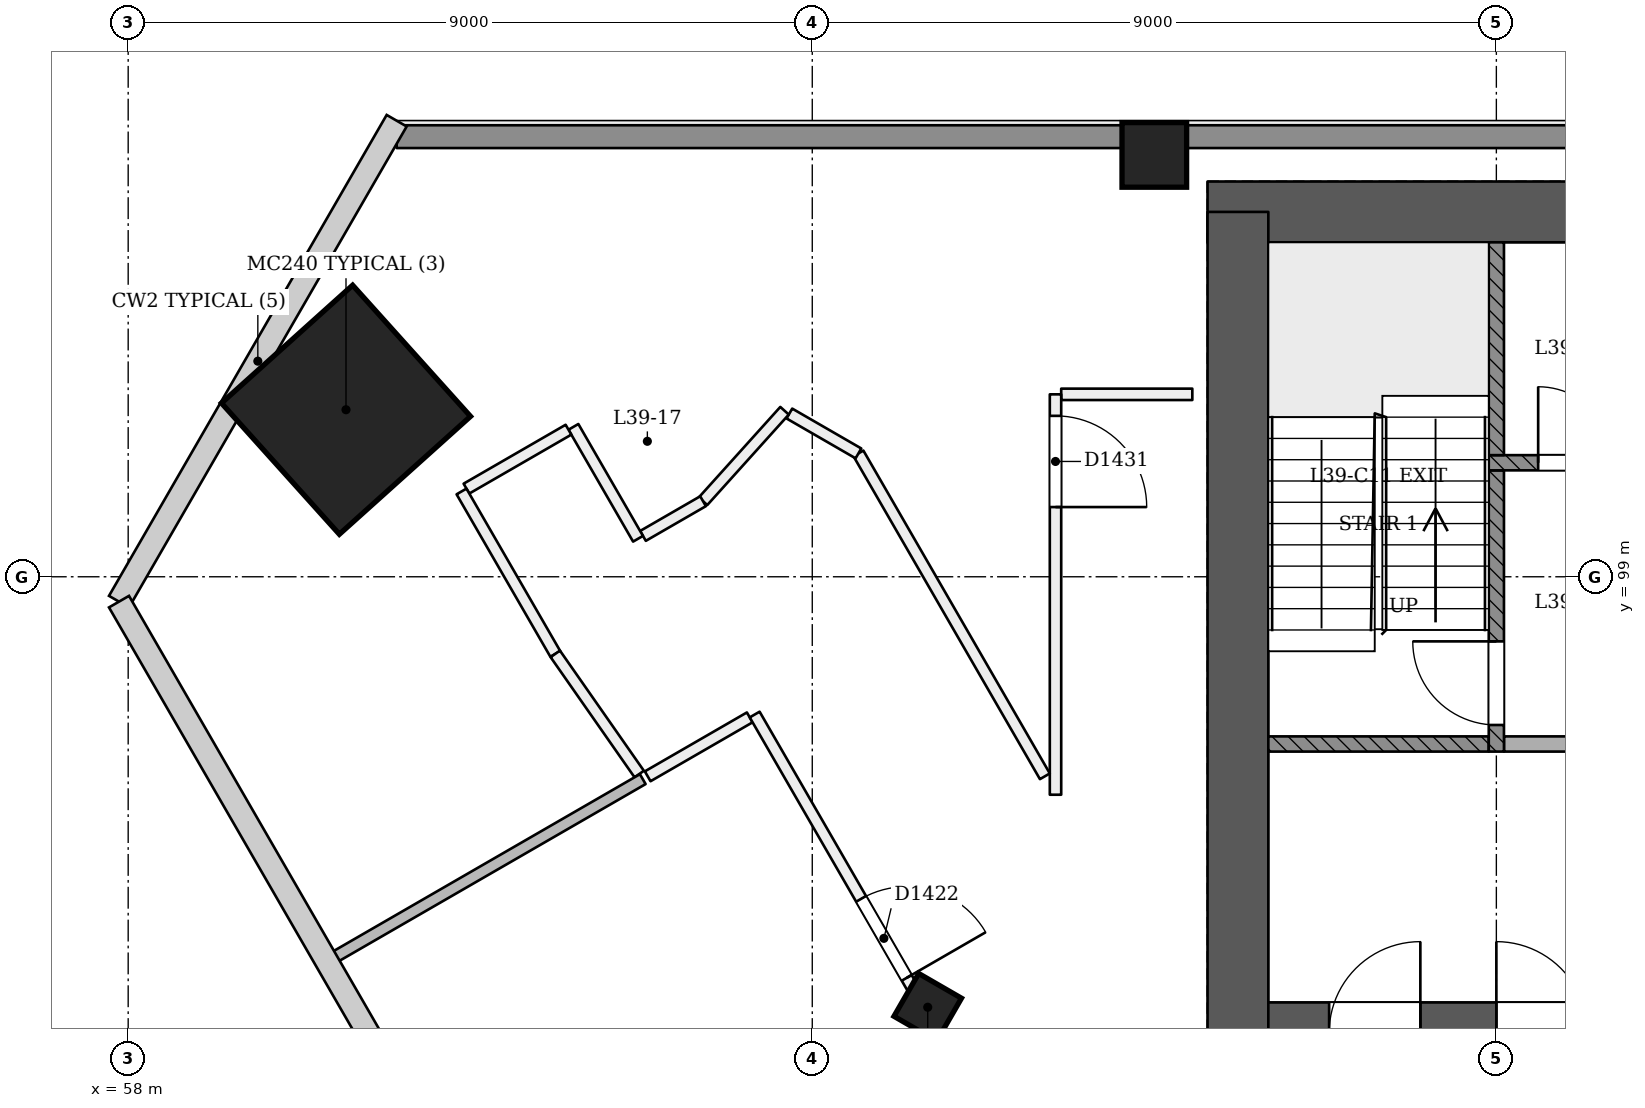
"""IFC4 building model, lengths in metres.
Left out: names, types, materials, properties, quantities, classifications, styles, units other than length and angle.
Written with IfcOpenShell. Run it as: python <this file> out.ifc"""

import sys

from ifc_helpers import new_model, si_unit, direction, frame, frame_2d, origin, origin_2d, place, context, subcontext, project, spatial, rectangle, extrude, element, fill, save


model = new_model("IFC4")
c1 = context("Model", 3, precision=1e-05, world=origin(), true_north=direction((0.0, 1.0)))
c2 = subcontext(c1, "Body", "Model", "MODEL_VIEW")
j1 = project(units=[si_unit("LENGTHUNIT", "METRE"), si_unit("PLANEANGLEUNIT", "RADIAN")], contexts=[c1])
p1 = place(None, origin())
s1 = spatial("IfcSite", under=j1, at=p1, CompositionType="ELEMENT")
p2 = place(p1, origin())
s2 = spatial("IfcBuilding", under=s1, at=p2, CompositionType="ELEMENT")
p3 = place(p2, frame((0.0, 0.0, 153.0)))
s3 = spatial("IfcBuildingStorey", under=s2, at=p3, CompositionType="ELEMENT", Elevation=153.0)
p4 = place(p3, frame((72.6, 93.0, 0.0), z_axis=(0.0, 0.0, 1.0), x_axis=(1.0, 0.0, 0.0)))
e1 = element("IfcWall", 1, at=p4, inside=s3, PredefinedType="SHEAR", context=c2, shape_type="SweptSolid", body=[
    extrude(rectangle(XDim=25.2, YDim=0.8, at=frame_2d((12.6, 0.0))), origin(), (0.0, 0.0, 1.0), 3.6),
])
p5 = place(p4, frame((1.2, 0.0, 0.0)))
e2 = element("IfcOpeningElement", 2, at=p5, cuts=e1, PredefinedType="OPENING", context=c2, shape_type="SweptSolid", body=[
    extrude(rectangle(XDim=1.2, YDim=2.1, at=frame_2d((0.6, 1.05))), frame((0.0, 0.411, 0.0), z_axis=(0.0, -1.0, 0.0), x_axis=(1.0, 0.0, 0.0)), (0.0, 0.0, 1.0), 0.821),
])
p6 = place(p4, frame((3.4, 0.0, 0.0)))
e3 = element("IfcOpeningElement", 3, at=p6, cuts=e1, PredefinedType="OPENING", context=c2, shape_type="SweptSolid", body=[
    extrude(rectangle(XDim=1.2, YDim=2.1, at=frame_2d((0.6, 1.05))), frame((0.0, 0.411, 0.0), z_axis=(0.0, -1.0, 0.0), x_axis=(1.0, 0.0, 0.0)), (0.0, 0.0, 1.0), 0.821),
])
p7 = place(p4, frame((13.4, 0.0, 0.0)))
e4 = element("IfcOpeningElement", 4, at=p7, cuts=e1, PredefinedType="OPENING", context=c2, shape_type="SweptSolid", body=[
    extrude(rectangle(XDim=1.2, YDim=2.1, at=frame_2d((0.6, 1.05))), frame((0.0, 0.411, 0.0), z_axis=(0.0, -1.0, 0.0), x_axis=(1.0, 0.0, 0.0)), (0.0, 0.0, 1.0), 0.821),
])
p8 = place(p4, frame((15.712, 0.0, 0.0)))
e5 = element("IfcOpeningElement", 5, at=p8, cuts=e1, PredefinedType="OPENING", context=c2, shape_type="SweptSolid", body=[
    extrude(rectangle(XDim=1.0, YDim=2.1, at=frame_2d((0.5, 1.05))), frame((0.0, 0.411, 0.0), z_axis=(0.0, -1.0, 0.0), x_axis=(1.0, 0.0, 0.0)), (0.0, 0.0, 1.0), 0.821),
])
p9 = place(p4, frame((19.15, 0.0, 0.0)))
e6 = element("IfcOpeningElement", 6, at=p9, cuts=e1, PredefinedType="OPENING", context=c2, shape_type="SweptSolid", body=[
    extrude(rectangle(XDim=1.0, YDim=2.1, at=frame_2d((0.5, 1.05))), frame((0.0, 0.411, 0.0), z_axis=(0.0, -1.0, 0.0), x_axis=(1.0, 0.0, 0.0)), (0.0, 0.0, 1.0), 0.821),
])
p10 = place(p4, frame((22.688, 0.0, 0.0)))
e7 = element("IfcOpeningElement", 7, at=p10, cuts=e1, PredefinedType="OPENING", context=c2, shape_type="SweptSolid", body=[
    extrude(rectangle(XDim=1.0, YDim=2.1, at=frame_2d((0.5, 1.05))), frame((0.0, 0.411, 0.0), z_axis=(0.0, -1.0, 0.0), x_axis=(1.0, 0.0, 0.0)), (0.0, 0.0, 1.0), 0.821),
])
p11 = place(p3, frame((97.4, 103.8, 0.0), z_axis=(0.0, 0.0, 1.0), x_axis=(-1.0, 0.0, 0.0)))
e8 = element("IfcWall", 8, at=p11, inside=s3, PredefinedType="SHEAR", context=c2, shape_type="SweptSolid", body=[
    extrude(rectangle(XDim=25.2, YDim=0.8, at=frame_2d((12.6, 0.0))), origin(), (0.0, 0.0, 1.0), 3.6),
])
p12 = place(p3, frame((72.6, 103.8, 0.0), z_axis=(0.0, 0.0, 1.0), x_axis=(0.0, -1.0, 0.0)))
e9 = element("IfcWall", 9, at=p12, inside=s3, PredefinedType="SHEAR", context=c2, shape_type="SweptSolid", body=[
    extrude(rectangle(XDim=11.2, YDim=0.8, at=frame_2d((5.6, 0.0))), origin(), (0.0, 0.0, 1.0), 3.6),
])
p13 = place(p3, frame((68.492, 93.29, -0.02), z_axis=(0.02215369191, 0.038413282303, 0.999016333038), x_axis=(-0.86535929663, -0.499678396489, 0.038402966283)))
e10 = element("IfcColumn", 10, at=p13, inside=s3, PredefinedType="COLUMN", context=c2, shape_type="SweptSolid", body=[
    extrude(rectangle(XDim=0.65, YDim=0.65, at=origin_2d()), origin(), (0.0, 0.0, 1.0), 3.604),
])
p14 = place(p3, frame((60.832, 101.186, 0.0), z_axis=(0.028401796786, 0.009286506348, 0.999553449666), x_axis=(-0.866197501375, 0.499302452977, 0.019973709278)))
e11 = element("IfcColumn", 11, at=p14, inside=s3, PredefinedType="COLUMN", context=c2, shape_type="SweptSolid", body=[
    extrude(rectangle(XDim=2.32, YDim=2.32, at=origin_2d()), origin(), (0.0, 0.0, 1.0), 3.602),
])
p15 = place(p3, frame((71.5, 104.55, 0.0), z_axis=(0.0, 0.0, 1.0), x_axis=(1.0, 0.0, 0.0)))
e12 = element("IfcColumn", 12, at=p15, inside=s3, PredefinedType="COLUMN", context=c2, shape_type="SweptSolid", body=[
    extrude(rectangle(XDim=0.85, YDim=0.85, at=origin_2d()), origin(), (0.0, 0.0, 1.0), 3.6),
])
p16 = place(p3, frame((64.835, 96.375, 0.0), z_axis=(0.0, 0.0, 1.0), x_axis=(0.86601511528, 0.500017819788, 0.0)))
e13 = element("IfcWall", 13, at=p16, inside=s3, PredefinedType="PARTITIONING", context=c2, shape_type="SweptSolid", body=[
    extrude(rectangle(XDim=1.55, YDim=0.15, at=frame_2d((0.775, 0.0))), origin(), (0.0, 0.0, 1.0), 3.15),
])
p17 = place(p3, frame((66.242, 97.188, 0.0), z_axis=(0.0, 0.0, 1.0), x_axis=(0.500002614046, -0.866023894559, 0.0)))
e14 = element("IfcWall", 14, at=p17, inside=s3, PredefinedType="PARTITIONING", context=c2, shape_type="SweptSolid", body=[
    extrude(rectangle(XDim=37.515, YDim=0.15, at=frame_2d((18.758, 0.0))), origin(), (0.0, 0.0, 1.0), 2.75),
])
p18 = place(p17, frame((2.8, 0.0, 0.0)))
e15 = element("IfcOpeningElement", 15, at=p18, cuts=e14, PredefinedType="OPENING", context=c2, shape_type="SweptSolid", body=[
    extrude(rectangle(XDim=1.2, YDim=2.1, at=frame_2d((0.6, 1.05))), frame((0.0, 0.085, 0.0), z_axis=(0.0, -1.0, 0.0), x_axis=(1.0, 0.0, 0.0)), (0.0, 0.0, 1.0), 0.171),
])
p19 = place(p17, frame((11.8, 0.0, 0.0)))
e16 = element("IfcOpeningElement", 16, at=p19, cuts=e14, PredefinedType="OPENING", context=c2, shape_type="SweptSolid", body=[
    extrude(rectangle(XDim=1.2, YDim=2.1, at=frame_2d((0.6, 1.05))), frame((0.0, 0.085, 0.0), z_axis=(0.0, -1.0, 0.0), x_axis=(1.0, 0.0, 0.0)), (0.0, 0.0, 1.0), 0.171),
])
p20 = place(p17, frame((24.15, 0.0, 0.0)))
e17 = element("IfcOpeningElement", 17, at=p20, cuts=e14, PredefinedType="OPENING", context=c2, shape_type="SweptSolid", body=[
    extrude(rectangle(XDim=1.2, YDim=2.1, at=frame_2d((0.6, 1.05))), frame((0.0, 0.085, 0.0), z_axis=(0.0, -1.0, 0.0), x_axis=(1.0, 0.0, 0.0)), (0.0, 0.0, 1.0), 0.171),
])
p21 = place(p17, frame((33.25, 0.0, 0.0)))
e18 = element("IfcOpeningElement", 18, at=p21, cuts=e14, PredefinedType="OPENING", context=c2, shape_type="SweptSolid", body=[
    extrude(rectangle(XDim=1.0, YDim=2.1, at=frame_2d((0.5, 1.05))), frame((0.0, 0.085, 0.0), z_axis=(0.0, -1.0, 0.0), x_axis=(1.0, 0.0, 0.0)), (0.0, 0.0, 1.0), 0.171),
])
p22 = place(p3, frame((72.0, 101.4, 0.0), z_axis=(0.0, 0.0, 1.0), x_axis=(-1.0, 0.0, 0.0)))
e19 = element("IfcWall", 19, at=p22, inside=s3, PredefinedType="PARTITIONING", context=c2, shape_type="SweptSolid", body=[
    extrude(rectangle(XDim=1.725, YDim=0.15, at=frame_2d((0.863, 0.0))), origin(), (0.0, 0.0, 1.0), 3.15),
])
p23 = place(p3, frame((70.2, 101.4, 0.0), z_axis=(0.0, 0.0, 1.0), x_axis=(0.0, -1.0, 0.0)))
e20 = element("IfcWall", 20, at=p23, inside=s3, PredefinedType="PARTITIONING", context=c2, shape_type="SweptSolid", body=[
    extrude(rectangle(XDim=5.267, YDim=0.15, at=frame_2d((2.634, 0.0))), origin(), (0.0, 0.0, 1.0), 3.15),
])
p24 = place(p23, frame((0.283, 0.0, 0.0)))
e21 = element("IfcOpeningElement", 21, at=p24, cuts=e20, PredefinedType="OPENING", context=c2, shape_type="SweptSolid", body=[
    extrude(rectangle(XDim=1.2, YDim=2.1, at=frame_2d((0.6, 1.05))), frame((0.0, 0.085, 0.0), z_axis=(0.0, -1.0, 0.0), x_axis=(1.0, 0.0, 0.0)), (0.0, 0.0, 1.0), 0.171),
])
p25 = place(p3, frame((70.06, 96.375, 0.0), z_axis=(0.0, 0.0, 1.0), x_axis=(-0.500003931296, 0.866023134038, 0.0)))
e22 = element("IfcWall", 22, at=p25, inside=s3, PredefinedType="PARTITIONING", context=c2, shape_type="SweptSolid", body=[
    extrude(rectangle(XDim=4.905, YDim=0.15, at=frame_2d((2.453, 0.0))), origin(), (0.0, 0.0, 1.0), 3.15),
])
p26 = place(p3, frame((67.607, 100.623, 0.0), z_axis=(0.0, 0.0, 1.0), x_axis=(-0.866115844577, 0.499843319224, 0.0)))
e23 = element("IfcWall", 23, at=p26, inside=s3, PredefinedType="PARTITIONING", context=c2, shape_type="SweptSolid", body=[
    extrude(rectangle(XDim=1.049, YDim=0.15, at=frame_2d((0.524, 0.0))), origin(), (0.0, 0.0, 1.0), 3.15),
])
p27 = place(p3, frame((66.635, 101.184, 0.0), z_axis=(0.0, 0.0, 1.0), x_axis=(-0.669267758955, -0.743021309805, 0.0)))
e24 = element("IfcWall", 24, at=p27, inside=s3, PredefinedType="PARTITIONING", context=c2, shape_type="SweptSolid", body=[
    extrude(rectangle(XDim=1.602, YDim=0.15, at=frame_2d((0.801, 0.0))), origin(), (0.0, 0.0, 1.0), 3.15),
])
p28 = place(p3, frame((65.563, 99.994, 0.0), z_axis=(0.0, 0.0, 1.0), x_axis=(-0.866011828767, -0.500023511883, 0.0)))
e25 = element("IfcWall", 25, at=p28, inside=s3, PredefinedType="PARTITIONING", context=c2, shape_type="SweptSolid", body=[
    extrude(rectangle(XDim=0.913, YDim=0.15, at=frame_2d((0.456, 0.0))), origin(), (0.0, 0.0, 1.0), 3.15),
])
p29 = place(p3, frame((64.708, 99.5, 0.0), z_axis=(0.0, 0.0, 1.0), x_axis=(-0.500062241894, 0.865989465428, 0.0)))
e26 = element("IfcWall", 26, at=p29, inside=s3, PredefinedType="PARTITIONING", context=c2, shape_type="SweptSolid", body=[
    extrude(rectangle(XDim=1.7, YDim=0.15, at=frame_2d((0.85, 0.0))), origin(), (0.0, 0.0, 1.0), 3.15),
])
p30 = place(p3, frame((63.793, 100.935, 0.0), z_axis=(0.0, 0.0, 1.0), x_axis=(-0.865975732936, -0.500086022567, 0.0)))
e27 = element("IfcWall", 27, at=p30, inside=s3, PredefinedType="PARTITIONING", context=c2, shape_type="SweptSolid", body=[
    extrude(rectangle(XDim=1.55, YDim=0.15, at=frame_2d((0.775, 0.0))), origin(), (0.0, 0.0, 1.0), 3.15),
])
p31 = place(p3, frame((62.385, 100.122, 0.0), z_axis=(0.0, 0.0, 1.0), x_axis=(0.499959415009, -0.866048834272, 0.0)))
e28 = element("IfcWall", 28, at=p31, inside=s3, PredefinedType="PARTITIONING", context=c2, shape_type="SweptSolid", body=[
    extrude(rectangle(XDim=2.468, YDim=0.15, at=frame_2d((1.234, 0.0))), origin(), (0.0, 0.0, 1.0), 3.15),
])
p32 = place(p3, frame((63.619, 97.985, 0.0), z_axis=(0.0, 0.0, 1.0), x_axis=(0.572569724847, -0.81985603016, 0.0)))
e29 = element("IfcWall", 29, at=p32, inside=s3, PredefinedType="PARTITIONING", context=c2, shape_type="SweptSolid", body=[
    extrude(rectangle(XDim=1.928, YDim=0.15, at=frame_2d((0.964, 0.0))), origin(), (0.0, 0.0, 1.0), 3.15),
])
p33 = place(p3, frame((64.77, 96.338, 0.0), z_axis=(0.0, 0.0, 1.0), x_axis=(-0.866016039709, -0.500016218704, 0.0)))
e30 = element("IfcWall", 30, at=p33, inside=s3, PredefinedType="PARTITIONING", context=c2, shape_type="SweptSolid", body=[
    extrude(rectangle(XDim=4.7, YDim=0.15, at=frame_2d((2.35, 0.0))), origin(), (0.0, 0.0, 1.0), 2.65),
])
p34 = place(p3, frame((61.532, 104.79, 0.0), z_axis=(0.0, 0.0, 1.0), x_axis=(1.0, 0.0, 0.0)))
e31 = element("IfcWall", 31, at=p34, inside=s3, PredefinedType="SOLIDWALL", context=c2, shape_type="SweptSolid", body=[
    extrude(rectangle(XDim=46.936, YDim=0.3, at=frame_2d((23.468, 0.0))), origin(), (0.0, 0.0, 1.0), 2.65),
])
p35 = place(p3, frame((73.0, 96.8, 0.0), z_axis=(0.0, 0.0, 1.0), x_axis=(1.0, 0.0, 0.0)))
e32 = element("IfcWall", 32, at=p35, inside=s3, PredefinedType="SOLIDWALL", context=c2, shape_type="SweptSolid", body=[
    extrude(rectangle(XDim=2.9, YDim=0.2, at=frame_2d((1.45, 0.0))), origin(), (0.0, 0.0, 1.0), 3.15),
])
p36 = place(p3, frame((76.0, 96.7, 0.0), z_axis=(0.0, 0.0, 1.0), x_axis=(0.0, 1.0, 0.0)))
e33 = element("IfcWall", 33, at=p36, inside=s3, PredefinedType="SOLIDWALL", context=c2, shape_type="SweptSolid", body=[
    extrude(rectangle(XDim=3.7, YDim=0.2, at=frame_2d((1.85, 0.0))), origin(), (0.0, 0.0, 1.0), 3.15),
])
p37 = place(p36, frame((0.35, 0.0, 0.0)))
e34 = element("IfcOpeningElement", 34, at=p37, cuts=e33, PredefinedType="OPENING", context=c2, shape_type="SweptSolid", body=[
    extrude(rectangle(XDim=1.1, YDim=2.1, at=frame_2d((0.55, 1.05))), frame((0.0, 0.11, 0.0), z_axis=(0.0, -1.0, 0.0), x_axis=(1.0, 0.0, 0.0)), (0.0, 0.0, 1.0), 0.221),
])
p38 = place(p3, frame((76.1, 96.8, 0.0), z_axis=(0.0, 0.0, 1.0), x_axis=(1.0, 0.0, 0.0)))
e35 = element("IfcWall", 35, at=p38, inside=s3, PredefinedType="PARTITIONING", context=c2, shape_type="SweptSolid", body=[
    extrude(rectangle(XDim=1.9, YDim=0.2, at=frame_2d((0.95, 0.0))), origin(), (0.0, 0.0, 1.0), 3.15),
])
p39 = place(p3, frame((75.9, 100.5, 0.0), z_axis=(0.0, 0.0, 1.0), x_axis=(1.0, 0.0, 0.0)))
e36 = element("IfcWall", 36, at=p39, inside=s3, PredefinedType="SOLIDWALL", context=c2, shape_type="SweptSolid", body=[
    extrude(rectangle(XDim=18.2, YDim=0.2, at=frame_2d((9.1, 0.0))), origin(), (0.0, 0.0, 1.0), 3.15),
])
p40 = place(p39, frame((2.6, 0.0, 0.0)))
e37 = element("IfcOpeningElement", 37, at=p40, cuts=e36, PredefinedType="OPENING", context=c2, shape_type="SweptSolid", body=[
    extrude(rectangle(XDim=1.1, YDim=2.1, at=frame_2d((0.55, 1.05))), frame((0.0, 0.11, 0.0), z_axis=(0.0, -1.0, 0.0), x_axis=(1.0, 0.0, 0.0)), (0.0, 0.0, 1.0), 0.221),
])
p41 = place(p39, frame((4.5, 0.0, 0.0)))
e38 = element("IfcOpeningElement", 38, at=p41, cuts=e36, PredefinedType="OPENING", context=c2, shape_type="SweptSolid", body=[
    extrude(rectangle(XDim=1.1, YDim=2.1, at=frame_2d((0.55, 1.05))), frame((0.0, 0.11, 0.0), z_axis=(0.0, -1.0, 0.0), x_axis=(1.0, 0.0, 0.0)), (0.0, 0.0, 1.0), 0.221),
])
p42 = place(p39, frame((6.4, 0.0, 0.0)))
e39 = element("IfcOpeningElement", 39, at=p42, cuts=e36, PredefinedType="OPENING", context=c2, shape_type="SweptSolid", body=[
    extrude(rectangle(XDim=1.1, YDim=2.1, at=frame_2d((0.55, 1.05))), frame((0.0, 0.11, 0.0), z_axis=(0.0, -1.0, 0.0), x_axis=(1.0, 0.0, 0.0)), (0.0, 0.0, 1.0), 0.221),
])
p43 = place(p39, frame((8.3, 0.0, 0.0)))
e40 = element("IfcOpeningElement", 40, at=p43, cuts=e36, PredefinedType="OPENING", context=c2, shape_type="SweptSolid", body=[
    extrude(rectangle(XDim=1.1, YDim=2.1, at=frame_2d((0.55, 1.05))), frame((0.0, 0.11, 0.0), z_axis=(0.0, -1.0, 0.0), x_axis=(1.0, 0.0, 0.0)), (0.0, 0.0, 1.0), 0.221),
])
p44 = place(p39, frame((10.2, 0.0, 0.0)))
e41 = element("IfcOpeningElement", 41, at=p44, cuts=e36, PredefinedType="OPENING", context=c2, shape_type="SweptSolid", body=[
    extrude(rectangle(XDim=1.1, YDim=2.1, at=frame_2d((0.55, 1.05))), frame((0.0, 0.11, 0.0), z_axis=(0.0, -1.0, 0.0), x_axis=(1.0, 0.0, 0.0)), (0.0, 0.0, 1.0), 0.221),
])
p45 = place(p39, frame((12.1, 0.0, 0.0)))
e42 = element("IfcOpeningElement", 42, at=p45, cuts=e36, PredefinedType="OPENING", context=c2, shape_type="SweptSolid", body=[
    extrude(rectangle(XDim=1.1, YDim=2.1, at=frame_2d((0.55, 1.05))), frame((0.0, 0.11, 0.0), z_axis=(0.0, -1.0, 0.0), x_axis=(1.0, 0.0, 0.0)), (0.0, 0.0, 1.0), 0.221),
])
p46 = place(p39, frame((14.0, 0.0, 0.0)))
e43 = element("IfcOpeningElement", 43, at=p46, cuts=e36, PredefinedType="OPENING", context=c2, shape_type="SweptSolid", body=[
    extrude(rectangle(XDim=1.1, YDim=2.1, at=frame_2d((0.55, 1.05))), frame((0.0, 0.11, 0.0), z_axis=(0.0, -1.0, 0.0), x_axis=(1.0, 0.0, 0.0)), (0.0, 0.0, 1.0), 0.221),
])
p47 = place(p39, frame((0.65, 0.0, 0.0)))
e44 = element("IfcOpeningElement", 44, at=p47, cuts=e36, PredefinedType="OPENING", context=c2, shape_type="SweptSolid", body=[
    extrude(rectangle(XDim=1.0, YDim=2.1, at=frame_2d((0.5, 1.05))), frame((0.0, 0.11, 0.0), z_axis=(0.0, -1.0, 0.0), x_axis=(1.0, 0.0, 0.0)), (0.0, 0.0, 1.0), 0.221),
])
p48 = place(p39, frame((16.3, 0.0, 0.0)))
e45 = element("IfcOpeningElement", 45, at=p48, cuts=e36, PredefinedType="OPENING", context=c2, shape_type="SweptSolid", body=[
    extrude(rectangle(XDim=1.0, YDim=2.1, at=frame_2d((0.5, 1.05))), frame((0.0, 0.11, 0.0), z_axis=(0.0, -1.0, 0.0), x_axis=(1.0, 0.0, 0.0)), (0.0, 0.0, 1.0), 0.221),
])
p49 = place(p3, frame((76.0, 100.6, 0.0), z_axis=(0.0, 0.0, 1.0), x_axis=(0.0, 1.0, 0.0)))
e46 = element("IfcWall", 46, at=p49, inside=s3, PredefinedType="SOLIDWALL", context=c2, shape_type="SweptSolid", body=[
    extrude(rectangle(XDim=2.8, YDim=0.2, at=frame_2d((1.4, 0.0))), origin(), (0.0, 0.0, 1.0), 3.15),
])
p50 = place(p18, origin())
e47 = element("IfcDoor", 47, at=p50, inside=s3, OperationType="SINGLE_SWING_RIGHT", PredefinedType="NOTDEFINED", context=c2, shape_type="SweptSolid", body=[
    extrude(rectangle(XDim=1.2, YDim=2.1, at=frame_2d((0.6, 1.05))), frame((0.0, 0.025, 0.0), z_axis=(0.0, -1.0, 0.0), x_axis=(1.0, 0.0, 0.0)), (0.0, 0.0, 1.0), 0.05),
])
fill(e15, e47)
p51 = place(p24, origin())
e48 = element("IfcDoor", 48, at=p51, inside=s3, OperationType="SINGLE_SWING_RIGHT", PredefinedType="NOTDEFINED", context=c2, shape_type="SweptSolid", body=[
    extrude(rectangle(XDim=1.2, YDim=2.1, at=frame_2d((0.6, 1.05))), frame((0.0, 0.025, 0.0), z_axis=(0.0, -1.0, 0.0), x_axis=(1.0, 0.0, 0.0)), (0.0, 0.0, 1.0), 0.05),
])
fill(e21, e48)
p52 = place(p37, origin())
e49 = element("IfcDoor", 49, at=p52, inside=s3, OperationType="SINGLE_SWING_RIGHT", PredefinedType="NOTDEFINED", context=c2, shape_type="SweptSolid", body=[
    extrude(rectangle(XDim=1.1, YDim=2.1, at=frame_2d((0.55, 1.05))), frame((0.0, 0.025, 0.0), z_axis=(0.0, -1.0, 0.0), x_axis=(1.0, 0.0, 0.0)), (0.0, 0.0, 1.0), 0.05),
])
fill(e34, e49)
p53 = place(p47, origin())
e50 = element("IfcDoor", 50, at=p53, inside=s3, OperationType="SINGLE_SWING_LEFT", PredefinedType="NOTDEFINED", context=c2, shape_type="SweptSolid", body=[
    extrude(rectangle(XDim=1.0, YDim=2.1, at=frame_2d((0.5, 1.05))), frame((0.0, 0.025, 0.0), z_axis=(0.0, -1.0, 0.0), x_axis=(1.0, 0.0, 0.0)), (0.0, 0.0, 1.0), 0.05),
])
fill(e44, e50)
save(model, sys.argv[1])
